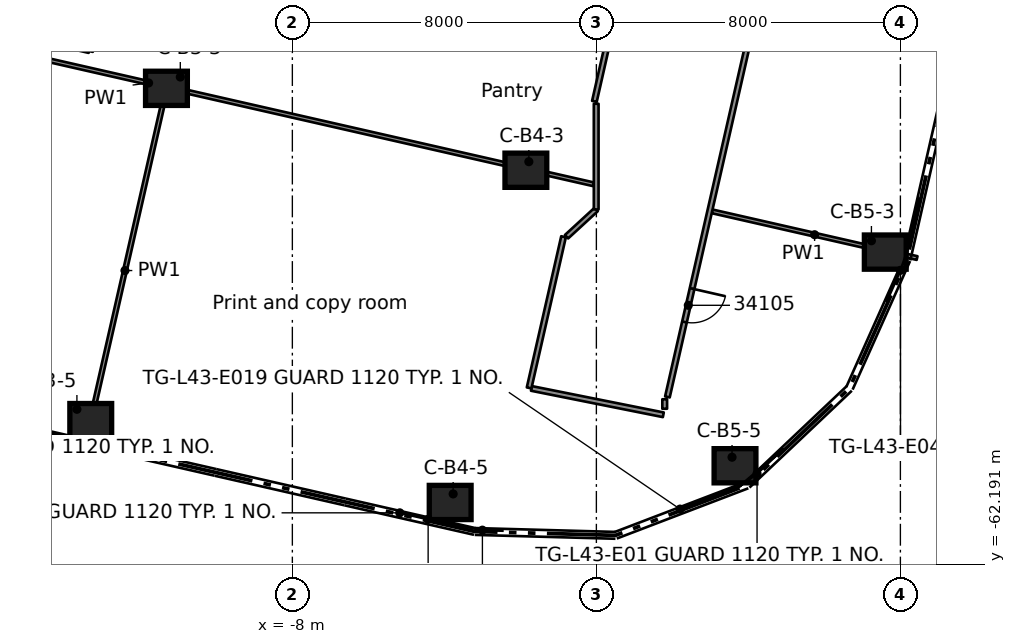
"""IFC4 building model, lengths in metres.
Left out: names, types, materials, properties, quantities, classifications, styles, units other than length and angle.
Written with IfcOpenShell. Run it as: python <this file> out.ifc"""

import sys

from ifc_helpers import new_model, si_unit, direction, frame, frame_2d, origin, origin_2d, place, context, subcontext, project, spatial, rectangle, extrude, element, fill, save


model = new_model("IFC4")
c1 = context("Model", 3, precision=1e-05, world=origin(), true_north=direction((0.0, 1.0)))
c2 = subcontext(c1, "Body", "Model", "MODEL_VIEW")
j1 = project(units=[si_unit("LENGTHUNIT", "METRE"), si_unit("PLANEANGLEUNIT", "RADIAN")], contexts=[c1])
p1 = place(None, origin())
s1 = spatial("IfcSite", under=j1, at=p1, CompositionType="ELEMENT")
p2 = place(p1, origin())
s2 = spatial("IfcBuilding", under=s1, at=p2, CompositionType="ELEMENT")
p3 = place(p2, frame((0.0, 0.0, 167.1)))
s3 = spatial("IfcBuildingStorey", under=s2, at=p3, CompositionType="ELEMENT", Elevation=167.1)
for number, where, z_axis, x_axis in (
    (1, (-11.313, -49.661, 0.0), (0.0, 0.0, 1.0), (1.0, 0.0, 0.0)),
    (2, (-13.305, -58.404, 0.0), (0.0, 0.0, 1.0), (1.0, 0.0, 0.0)),
    (3, (-1.855, -51.816, 0.0), (0.0, 0.0, 1.0), (1.0, 0.0, 0.0)),
    (4, (-3.847, -60.558, 0.0), (0.0, 0.0, 1.0), (1.0, 0.0, 0.0)),
    (5, (7.602, -53.97, 0.0), (0.0, 0.0, 1.0), (1.0, 0.0, 0.0)),
    (6, (3.648, -59.592, 0.0), (0.0, 0.0, 1.0), (1.0, 0.0, 0.0)),
):
    element("IfcColumn", number, at=place(p3, frame(where, z_axis=z_axis, x_axis=x_axis)), inside=s3, PredefinedType="COLUMN", context=c2, shape_type="SweptSolid", body=[
        extrude(rectangle(XDim=1.1, YDim=0.9, at=origin_2d()), origin(), (0.0, 0.0, 1.0), 3.5),
    ])
p4 = place(p3, frame((-1.709, -57.557, 0.0), z_axis=(0.0, 0.0, 1.0), x_axis=(0.98058598093, -0.196089607075, 0.0)))
e7 = element("IfcWall", 7, at=p4, inside=s3, PredefinedType="PARTITIONING", context=c2, shape_type="SweptSolid", body=[
    extrude(rectangle(XDim=3.54, YDim=0.125, at=frame_2d((1.77, 0.0))), origin(), (0.0, 0.0, 1.0), 3.06),
])
p5 = place(p3, frame((-23.487, -46.854, 0.0), z_axis=(0.0, 0.0, 1.0), x_axis=(0.975033161008, -0.222059304997, 0.0)))
e8 = element("IfcWall", 8, at=p5, inside=s3, PredefinedType="PARTITIONING", context=c2, shape_type="SweptSolid", body=[
    extrude(rectangle(XDim=24.007, YDim=0.1, at=frame_2d((12.004, 0.0))), origin(), (0.0, 0.0, 1.0), 3.06),
])
p6 = place(p3, frame((3.046, -52.898, 0.0), z_axis=(0.0, 0.0, 1.0), x_axis=(0.975003485187, -0.222189567426, 0.0)))
e9 = element("IfcWall", 9, at=p6, inside=s3, PredefinedType="PARTITIONING", context=c2, shape_type="SweptSolid", body=[
    extrude(rectangle(XDim=5.531, YDim=0.1, at=frame_2d((2.766, 0.0))), origin(), (0.0, 0.0, 1.0), 3.06),
])
p7 = place(p3, frame((-19.102, -47.369, 0.0), z_axis=(0.0, 0.0, 1.0), x_axis=(0.974994450255, -0.222229210436, 0.0)))
e10 = element("IfcWall", 10, at=p7, inside=s3, PredefinedType="PARTITIONING", context=c2, shape_type="SweptSolid", body=[
    extrude(rectangle(XDim=5.899, YDim=0.1, at=frame_2d((2.95, 0.0))), origin(), (0.0, 0.0, 1.0), 3.06),
])
p8 = place(p3, frame((-0.785, -53.565, 0.0), z_axis=(0.0, 0.0, 1.0), x_axis=(0.736206501859, 0.676756962742, 0.0)))
e11 = element("IfcWall", 11, at=p8, inside=s3, PredefinedType="PARTITIONING", context=c2, shape_type="SweptSolid", body=[
    extrude(rectangle(XDim=1.06, YDim=0.125, at=frame_2d((0.53, 0.0))), origin(), (0.0, 0.0, 1.0), 3.06),
])
p9 = place(p3, frame((4.962, -44.211, 0.0), z_axis=(0.0, 0.0, 1.0), x_axis=(-0.222229868657, -0.974994300228, 0.0)))
e12 = element("IfcWall", 12, at=p9, inside=s3, PredefinedType="PARTITIONING", context=c2, shape_type="SweptSolid", body=[
    extrude(rectangle(XDim=13.918, YDim=0.125, at=frame_2d((6.959, 0.0))), origin(), (0.0, 0.0, 1.0), 3.06),
])
p10 = place(p9, frame((2.341, 0.0, 0.0)))
e13 = element("IfcOpeningElement", 13, at=p10, cuts=e12, PredefinedType="OPENING", context=c2, shape_type="SweptSolid", body=[
    extrude(rectangle(XDim=1.8, YDim=2.1, at=frame_2d((0.9, 1.05))), frame((0.0, 0.073, 0.0), z_axis=(0.0, -1.0, 0.0), x_axis=(1.0, 0.0, 0.0)), (0.0, 0.0, 1.0), 0.145),
])
p11 = place(p9, frame((10.995, 0.0, 0.0)))
e14 = element("IfcOpeningElement", 14, at=p11, cuts=e12, PredefinedType="OPENING", context=c2, shape_type="SweptSolid", body=[
    extrude(rectangle(XDim=0.9, YDim=2.1, at=frame_2d((0.45, 1.05))), frame((0.0, 0.073, 0.0), z_axis=(0.0, -1.0, 0.0), x_axis=(1.0, 0.0, 0.0)), (0.0, 0.0, 1.0), 0.145),
])
p12 = place(p3, frame((-1.77, -57.544, 0.0), z_axis=(0.0, 0.0, 1.0), x_axis=(0.22206594154, 0.975031649542, 0.0)))
e15 = element("IfcWall", 15, at=p12, inside=s3, PredefinedType="PARTITIONING", context=c2, shape_type="SweptSolid", body=[
    extrude(rectangle(XDim=4.08, YDim=0.125, at=frame_2d((2.04, 0.0))), origin(), (0.0, 0.0, 1.0), 3.06),
])
p13 = place(p3, frame((-0.052, -50.005, 0.0), z_axis=(0.0, 0.0, 1.0), x_axis=(0.22157056649, 0.975144340119, 0.0)))
e16 = element("IfcWall", 16, at=p13, inside=s3, PredefinedType="PARTITIONING", context=c2, shape_type="SweptSolid", body=[
    extrude(rectangle(XDim=1.67, YDim=0.125, at=frame_2d((0.835, 0.0))), origin(), (0.0, 0.0, 1.0), 3.06),
])
p14 = place(p3, frame((-13.493, -59.233, 0.0), z_axis=(0.0, 0.0, 1.0), x_axis=(0.222147617684, 0.975013043993, 0.0)))
e17 = element("IfcWall", 17, at=p14, inside=s3, PredefinedType="PARTITIONING", context=c2, shape_type="SweptSolid", body=[
    extrude(rectangle(XDim=9.8, YDim=0.1, at=frame_2d((4.9, 0.0))), origin(), (0.0, 0.0, 1.0), 3.06),
])
p15 = place(p3, frame((1.798, -58.092, 0.0), z_axis=(0.0, 0.0, 1.0), x_axis=(0.0, 1.0, 0.0)))
e18 = element("IfcWall", 18, at=p15, inside=s3, PredefinedType="PARTITIONING", context=c2, shape_type="SweptSolid", body=[
    extrude(rectangle(XDim=0.25, YDim=0.125, at=frame_2d((0.125, 0.0))), origin(), (0.0, 0.0, 1.0), 3.06),
])
p16 = place(p3, frame((-0.005, -52.848, 0.0), z_axis=(0.0, 0.0, 1.0), x_axis=(0.0, 1.0, 0.0)))
e19 = element("IfcWall", 19, at=p16, inside=s3, PredefinedType="PARTITIONING", context=c2, shape_type="SweptSolid", body=[
    extrude(rectangle(XDim=2.781, YDim=0.125, at=frame_2d((1.391, 0.0))), origin(), (0.0, 0.0, 1.0), 3.06),
])
p17 = place(p11, origin())
e20 = element("IfcDoor", 20, at=p17, inside=s3, OperationType="SINGLE_SWING_RIGHT", PredefinedType="DOOR", context=c2, shape_type="SweptSolid", body=[
    extrude(rectangle(XDim=0.9, YDim=2.1, at=frame_2d((0.45, 1.05))), frame((0.0, 0.025, 0.0), z_axis=(0.0, -1.0, 0.0), x_axis=(1.0, 0.0, 0.0)), (0.0, 0.0, 1.0), 0.05),
])
fill(e14, e20)
save(model, sys.argv[1])
